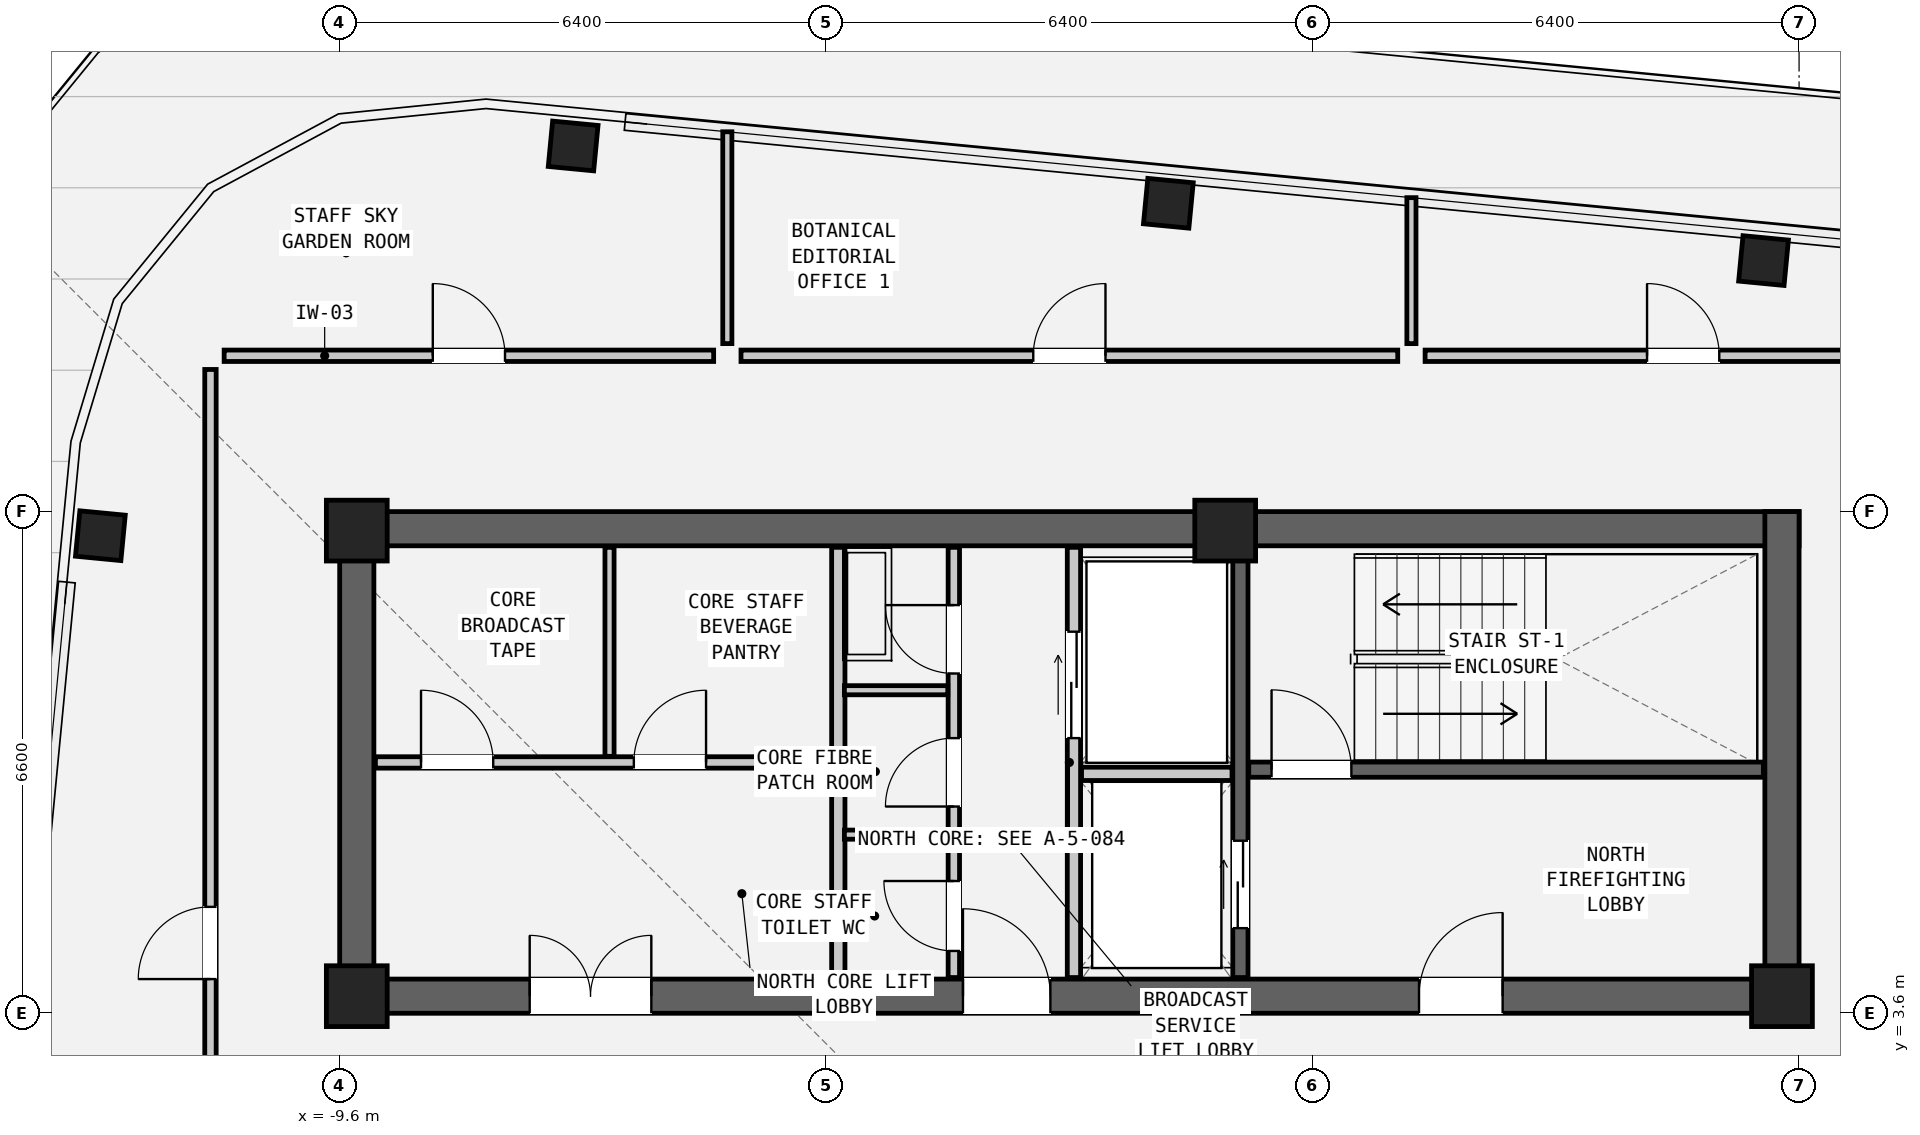
"""IFC4 building model, lengths in metres.
Left out: names, types, materials, properties, quantities, classifications, styles, units other than length and angle.
Written with IfcOpenShell. Run it as: python <this file> out.ifc"""

import sys

from ifc_helpers import new_model, si_unit, direction, frame, frame_2d, origin, origin_2d, place, context, subcontext, project, spatial, rectangle, hollow_rectangle, extrude, element, fill, save


model = new_model("IFC4")
c1 = context("Model", 3, precision=1e-05, world=origin(), true_north=direction((0.0, 1.0)))
c2 = subcontext(c1, "Body", "Model", "MODEL_VIEW")
j1 = project(units=[si_unit("LENGTHUNIT", "METRE"), si_unit("PLANEANGLEUNIT", "RADIAN")], contexts=[c1])
p1 = place(None, origin())
s1 = spatial("IfcSite", under=j1, at=p1, CompositionType="ELEMENT")
p2 = place(p1, origin())
s2 = spatial("IfcBuilding", under=s1, at=p2, CompositionType="ELEMENT")
p3 = place(p2, frame((0.0, 0.0, 273.35)))
s3 = spatial("IfcBuildingStorey", under=s2, at=p3, CompositionType="ELEMENT", Elevation=273.35)
p4 = place(p3, frame((-9.6, 9.975, 0.0), z_axis=(0.0, 0.0, 1.0), x_axis=(1.0, 0.0, 0.0)))
e1 = element("IfcWall", 1, at=p4, inside=s3, PredefinedType="SHEAR", context=c2, shape_type="SweptSolid", body=[
    extrude(rectangle(XDim=19.2, YDim=0.45, at=frame_2d((9.6, 0.0))), origin(), (0.0, 0.0, 1.0), 3.6),
])
p5 = place(p3, frame((-9.6, 3.825, 0.0), z_axis=(0.0, 0.0, 1.0), x_axis=(1.0, 0.0, 0.0)))
e2 = element("IfcWall", 2, at=p5, inside=s3, PredefinedType="SHEAR", context=c2, shape_type="SweptSolid", body=[
    extrude(rectangle(XDim=19.2, YDim=0.45, at=frame_2d((9.6, 0.0))), origin(), (0.0, 0.0, 1.0), 3.6),
])
p6 = place(p5, frame((14.2, 0.0, 0.0)))
e3 = element("IfcOpeningElement", 3, at=p6, cuts=e2, PredefinedType="OPENING", context=c2, shape_type="SweptSolid", body=[
    extrude(rectangle(XDim=1.1, YDim=2.08, at=frame_2d((0.55, 1.04))), frame((0.0, 0.237, 0.0), z_axis=(0.0, -1.0, 0.0), x_axis=(1.0, 0.0, 0.0)), (0.0, 0.0, 1.0), 0.474),
])
p7 = place(p5, frame((8.2, 0.0, 0.0)))
e4 = element("IfcOpeningElement", 4, at=p7, cuts=e2, PredefinedType="OPENING", context=c2, shape_type="SweptSolid", body=[
    extrude(rectangle(XDim=1.15, YDim=2.1, at=frame_2d((0.575, 1.05))), frame((0.0, 0.237, 0.0), z_axis=(0.0, -1.0, 0.0), x_axis=(1.0, 0.0, 0.0)), (0.0, 0.0, 1.0), 0.474),
])
p8 = place(p5, frame((2.5, 0.0, 0.0)))
e5 = element("IfcOpeningElement", 5, at=p8, cuts=e2, PredefinedType="OPENING", context=c2, shape_type="SweptSolid", body=[
    extrude(rectangle(XDim=1.6, YDim=2.12, at=frame_2d((0.8, 1.06))), frame((0.0, 0.237, 0.0), z_axis=(0.0, -1.0, 0.0), x_axis=(1.0, 0.0, 0.0)), (0.0, 0.0, 1.0), 0.474),
])
for number, where, z_axis, x_axis in (
    (6, (-9.375, 3.6, 0.0), (0.0, 0.0, 1.0), (0.0, 1.0, 0.0)),
    (7, (9.375, 3.6, 0.0), (0.0, 0.0, 1.0), (0.0, 1.0, 0.0)),
):
    element("IfcWall", number, at=place(p3, frame(where, z_axis=z_axis, x_axis=x_axis)), inside=s3, PredefinedType="SHEAR", context=c2, shape_type="SweptSolid", body=[
        extrude(rectangle(XDim=6.6, YDim=0.45, at=frame_2d((3.3, 0.0))), origin(), (0.0, 0.0, 1.0), 3.6),
    ])
for number, where, z_axis, x_axis in (
    (8, (9.133, 13.502, 0.0), (0.0, 0.0, 1.0), (0.995, -0.096, 0.0)),
    (9, (1.302, 14.256, 0.0), (0.0, 0.0, 1.0), (0.995, -0.096, 0.0)),
    (10, (-6.528, 15.01, 0.0), (0.0, 0.0, 1.0), (0.995, -0.096, 0.0)),
    (11, (-12.749, 9.883, 0.0), (0.0, 0.0, 1.0), (0.096, 0.995, 0.0)),
):
    element("IfcColumn", number, at=place(p3, frame(where, z_axis=z_axis, x_axis=x_axis)), inside=s3, PredefinedType="COLUMN", context=c2, shape_type="SweptSolid", body=[
        extrude(hollow_rectangle(XDim=0.6, YDim=0.6, WallThickness=0.04, at=origin_2d()), origin(), (0.0, 0.0, 1.0), 3.6),
    ])
for number, where, z_axis, x_axis in (
    (12, (-9.375, 9.95, 0.0), (0.0, 0.0, 1.0), (1.0, 0.0, 0.0)),
    (13, (2.05, 9.95, 0.0), (0.0, 0.0, 1.0), (1.0, 0.0, 0.0)),
    (14, (-9.375, 3.825, 0.0), (0.0, 0.0, 1.0), (1.0, 0.0, 0.0)),
    (15, (9.375, 3.825, 0.0), (0.0, 0.0, 1.0), (1.0, 0.0, 0.0)),
):
    element("IfcColumn", number, at=place(p3, frame(where, z_axis=z_axis, x_axis=x_axis)), inside=s3, PredefinedType="COLUMN", context=c2, shape_type="SweptSolid", body=[
        extrude(rectangle(XDim=0.8, YDim=0.8, at=origin_2d()), origin(), (0.0, 0.0, 1.0), 3.6),
    ])
p9 = place(p3, frame((2.36, 6.805, 0.0), z_axis=(0.0, 0.0, 1.0), x_axis=(1.0, 0.0, 0.0)))
e16 = element("IfcWall", 16, at=p9, inside=s3, PredefinedType="SHEAR", context=c2, shape_type="SweptSolid", body=[
    extrude(rectangle(XDim=6.77, YDim=0.2, at=frame_2d((3.385, 0.0))), origin(), (0.0, 0.0, 1.0), 3.41),
])
p10 = place(p9, frame((0.3, 0.0, 0.0)))
e17 = element("IfcOpeningElement", 17, at=p10, cuts=e16, PredefinedType="OPENING", context=c2, shape_type="SweptSolid", body=[
    extrude(rectangle(XDim=1.05, YDim=2.08, at=frame_2d((0.525, 1.04))), frame((0.0, 0.112, 0.0), z_axis=(0.0, -1.0, 0.0), x_axis=(1.0, 0.0, 0.0)), (0.0, 0.0, 1.0), 0.224),
])
p11 = place(p3, frame((2.25, 4.07, 0.0), z_axis=(0.0, 0.0, 1.0), x_axis=(0.0, 1.0, 0.0)))
e18 = element("IfcWall", 18, at=p11, inside=s3, PredefinedType="SHEAR", context=c2, shape_type="SweptSolid", body=[
    extrude(rectangle(XDim=5.66, YDim=0.2, at=frame_2d((2.83, 0.0))), origin(), (0.0, 0.0, 1.0), 3.41),
])
p12 = place(p11, frame((0.65, 0.0, 0.0)))
e19 = element("IfcOpeningElement", 19, at=p12, cuts=e18, PredefinedType="OPENING", context=c2, shape_type="SweptSolid", body=[
    extrude(rectangle(XDim=1.15, YDim=2.08, at=frame_2d((0.575, 1.04))), frame((0.0, 0.112, 0.0), z_axis=(0.0, -1.0, 0.0), x_axis=(1.0, 0.0, 0.0)), (0.0, 0.0, 1.0), 0.224),
])
p13 = place(p3, frame((0.06, 4.07, 0.0), z_axis=(0.0, 0.0, 1.0), x_axis=(0.0, 1.0, 0.0)))
e20 = element("IfcWall", 20, at=p13, inside=s3, PredefinedType="PARTITIONING", context=c2, shape_type="SweptSolid", body=[
    extrude(rectangle(XDim=5.66, YDim=0.175, at=frame_2d((2.83, 0.0))), origin(), (0.0, 0.0, 1.0), 3.41),
])
p14 = place(p13, frame((3.15, 0.0, 0.0)))
e21 = element("IfcOpeningElement", 21, at=p14, cuts=e20, PredefinedType="OPENING", context=c2, shape_type="SweptSolid", body=[
    extrude(rectangle(XDim=1.4, YDim=2.12, at=frame_2d((0.7, 1.06))), frame((0.0, 0.1, 0.0), z_axis=(0.0, -1.0, 0.0), x_axis=(1.0, 0.0, 0.0)), (0.0, 0.0, 1.0), 0.199),
])
p15 = place(p3, frame((0.16, 6.75, 0.0), z_axis=(0.0, 0.0, 1.0), x_axis=(1.0, 0.0, 0.0)))
e22 = element("IfcWall", 22, at=p15, inside=s3, PredefinedType="PARTITIONING", context=c2, shape_type="SweptSolid", body=[
    extrude(rectangle(XDim=1.98, YDim=0.175, at=frame_2d((0.99, 0.0))), origin(), (0.0, 0.0, 1.0), 3.41),
])
p16 = place(p3, frame((-3.04, 4.07, 0.0), z_axis=(0.0, 0.0, 1.0), x_axis=(0.0, 1.0, 0.0)))
e23 = element("IfcWall", 23, at=p16, inside=s3, PredefinedType="PARTITIONING", context=c2, shape_type="SweptSolid", body=[
    extrude(rectangle(XDim=5.66, YDim=0.175, at=frame_2d((2.83, 0.0))), origin(), (0.0, 0.0, 1.0), 3.41),
])
p17 = place(p3, frame((-1.52, 4.07, 0.0), z_axis=(0.0, 0.0, 1.0), x_axis=(0.0, 1.0, 0.0)))
e24 = element("IfcWall", 24, at=p17, inside=s3, PredefinedType="PARTITIONING", context=c2, shape_type="SweptSolid", body=[
    extrude(rectangle(XDim=5.66, YDim=0.15, at=frame_2d((2.83, 0.0))), origin(), (0.0, 0.0, 1.0), 3.41),
])
p18 = place(p17, frame((4.0, 0.0, 0.0)))
e25 = element("IfcOpeningElement", 25, at=p18, cuts=e24, PredefinedType="OPENING", context=c2, shape_type="SweptSolid", body=[
    extrude(rectangle(XDim=0.9, YDim=2.05, at=frame_2d((0.45, 1.025))), frame((0.0, 0.087, 0.0), z_axis=(0.0, -1.0, 0.0), x_axis=(1.0, 0.0, 0.0)), (0.0, 0.0, 1.0), 0.174),
])
p19 = place(p17, frame((2.25, 0.0, 0.0)))
e26 = element("IfcOpeningElement", 26, at=p19, cuts=e24, PredefinedType="OPENING", context=c2, shape_type="SweptSolid", body=[
    extrude(rectangle(XDim=0.9, YDim=2.05, at=frame_2d((0.45, 1.025))), frame((0.0, 0.087, 0.0), z_axis=(0.0, -1.0, 0.0), x_axis=(1.0, 0.0, 0.0)), (0.0, 0.0, 1.0), 0.174),
])
p20 = place(p17, frame((0.35, 0.0, 0.0)))
e27 = element("IfcOpeningElement", 27, at=p20, cuts=e24, PredefinedType="OPENING", context=c2, shape_type="SweptSolid", body=[
    extrude(rectangle(XDim=0.92, YDim=2.1, at=frame_2d((0.46, 1.05))), frame((0.0, 0.087, 0.0), z_axis=(0.0, -1.0, 0.0), x_axis=(1.0, 0.0, 0.0)), (0.0, 0.0, 1.0), 0.174),
])
for number, where, z_axis, x_axis in (
    (28, (-2.96, 5.95, 0.0), (0.0, 0.0, 1.0), (1.0, 0.0, 0.0)),
    (29, (-2.96, 7.85, 0.0), (0.0, 0.0, 1.0), (1.0, 0.0, 0.0)),
):
    element("IfcWall", number, at=place(p3, frame(where, z_axis=z_axis, x_axis=x_axis)), inside=s3, PredefinedType="PARTITIONING", context=c2, shape_type="SweptSolid", body=[
        extrude(rectangle(XDim=1.36, YDim=0.12, at=frame_2d((0.68, 0.0))), origin(), (0.0, 0.0, 1.0), 3.41),
    ])
p21 = place(p3, frame((-9.13, 6.9, 0.0), z_axis=(0.0, 0.0, 1.0), x_axis=(1.0, 0.0, 0.0)))
e30 = element("IfcWall", 30, at=p21, inside=s3, PredefinedType="PARTITIONING", context=c2, shape_type="SweptSolid", body=[
    extrude(rectangle(XDim=6.01, YDim=0.15, at=frame_2d((3.005, 0.0))), origin(), (0.0, 0.0, 1.0), 3.41),
])
p22 = place(p21, frame((0.6, 0.0, 0.0)))
e31 = element("IfcOpeningElement", 31, at=p22, cuts=e30, PredefinedType="OPENING", context=c2, shape_type="SweptSolid", body=[
    extrude(rectangle(XDim=0.95, YDim=2.1, at=frame_2d((0.475, 1.05))), frame((0.0, 0.087, 0.0), z_axis=(0.0, -1.0, 0.0), x_axis=(1.0, 0.0, 0.0)), (0.0, 0.0, 1.0), 0.174),
])
p23 = place(p21, frame((3.4, 0.0, 0.0)))
e32 = element("IfcOpeningElement", 32, at=p23, cuts=e30, PredefinedType="OPENING", context=c2, shape_type="SweptSolid", body=[
    extrude(rectangle(XDim=0.95, YDim=2.1, at=frame_2d((0.475, 1.05))), frame((0.0, 0.087, 0.0), z_axis=(0.0, -1.0, 0.0), x_axis=(1.0, 0.0, 0.0)), (0.0, 0.0, 1.0), 0.174),
])
p24 = place(p3, frame((-6.05, 6.98, 0.0), z_axis=(0.0, 0.0, 1.0), x_axis=(0.0, 1.0, 0.0)))
e33 = element("IfcWall", 33, at=p24, inside=s3, PredefinedType="PARTITIONING", context=c2, shape_type="SweptSolid", body=[
    extrude(rectangle(XDim=2.75, YDim=0.12, at=frame_2d((1.375, 0.0))), origin(), (0.0, 0.0, 1.0), 3.41),
])
p25 = place(p3, frame((-4.5, 12.41, 0.0), z_axis=(0.0, 0.0, 1.0), x_axis=(0.0, 1.0, 0.0)))
e34 = element("IfcWall", 34, at=p25, inside=s3, PredefinedType="PARTITIONING", context=c2, shape_type="SweptSolid", body=[
    extrude(rectangle(XDim=2.787, YDim=0.12, at=frame_2d((1.394, 0.0))), origin(), (0.0, 0.0, 1.0), 3.41),
])
p26 = place(p3, frame((4.5, 12.41, 0.0), z_axis=(0.0, 0.0, 1.0), x_axis=(0.0, 1.0, 0.0)))
e35 = element("IfcWall", 35, at=p26, inside=s3, PredefinedType="PARTITIONING", context=c2, shape_type="SweptSolid", body=[
    extrude(rectangle(XDim=1.92, YDim=0.12, at=frame_2d((0.96, 0.0))), origin(), (0.0, 0.0, 1.0), 3.41),
])
p27 = place(p3, frame((-11.12, 12.25, 0.0), z_axis=(0.0, 0.0, 1.0), x_axis=(1.0, 0.0, 0.0)))
e36 = element("IfcWall", 36, at=p27, inside=s3, PredefinedType="PARTITIONING", context=c2, shape_type="SweptSolid", body=[
    extrude(rectangle(XDim=6.44, YDim=0.15, at=frame_2d((3.22, 0.0))), origin(), (0.0, 0.0, 1.0), 3.41),
])
p28 = place(p27, frame((2.745, 0.0, 0.0)))
e37 = element("IfcOpeningElement", 37, at=p28, cuts=e36, PredefinedType="OPENING", context=c2, shape_type="SweptSolid", body=[
    extrude(rectangle(XDim=0.95, YDim=2.1, at=frame_2d((0.475, 1.05))), frame((0.0, 0.087, 0.0), z_axis=(0.0, -1.0, 0.0), x_axis=(1.0, 0.0, 0.0)), (0.0, 0.0, 1.0), 0.174),
])
p29 = place(p3, frame((-4.32, 12.25, 0.0), z_axis=(0.0, 0.0, 1.0), x_axis=(1.0, 0.0, 0.0)))
e38 = element("IfcWall", 38, at=p29, inside=s3, PredefinedType="PARTITIONING", context=c2, shape_type="SweptSolid", body=[
    extrude(rectangle(XDim=8.64, YDim=0.15, at=frame_2d((4.32, 0.0))), origin(), (0.0, 0.0, 1.0), 3.41),
])
p30 = place(p29, frame((3.845, 0.0, 0.0)))
e39 = element("IfcOpeningElement", 39, at=p30, cuts=e38, PredefinedType="OPENING", context=c2, shape_type="SweptSolid", body=[
    extrude(rectangle(XDim=0.95, YDim=2.1, at=frame_2d((0.475, 1.05))), frame((0.0, 0.087, 0.0), z_axis=(0.0, -1.0, 0.0), x_axis=(1.0, 0.0, 0.0)), (0.0, 0.0, 1.0), 0.174),
])
p31 = place(p3, frame((4.68, 12.25, 0.0), z_axis=(0.0, 0.0, 1.0), x_axis=(1.0, 0.0, 0.0)))
e40 = element("IfcWall", 40, at=p31, inside=s3, PredefinedType="PARTITIONING", context=c2, shape_type="SweptSolid", body=[
    extrude(rectangle(XDim=6.79, YDim=0.15, at=frame_2d((3.395, 0.0))), origin(), (0.0, 0.0, 1.0), 3.41),
])
p32 = place(p31, frame((2.92, 0.0, 0.0)))
e41 = element("IfcOpeningElement", 41, at=p32, cuts=e40, PredefinedType="OPENING", context=c2, shape_type="SweptSolid", body=[
    extrude(rectangle(XDim=0.95, YDim=2.1, at=frame_2d((0.475, 1.05))), frame((0.0, 0.087, 0.0), z_axis=(0.0, -1.0, 0.0), x_axis=(1.0, 0.0, 0.0)), (0.0, 0.0, 1.0), 0.174),
])
p33 = place(p3, frame((-11.3, -3.02, 0.0), z_axis=(0.0, 0.0, 1.0), x_axis=(0.0, 1.0, 0.0)))
e42 = element("IfcWall", 42, at=p33, inside=s3, PredefinedType="PARTITIONING", context=c2, shape_type="SweptSolid", body=[
    extrude(rectangle(XDim=15.09, YDim=0.15, at=frame_2d((7.545, 0.0))), origin(), (0.0, 0.0, 1.0), 3.41),
])
p34 = place(p33, frame((7.07, 0.0, 0.0)))
e43 = element("IfcOpeningElement", 43, at=p34, cuts=e42, PredefinedType="OPENING", context=c2, shape_type="SweptSolid", body=[
    extrude(rectangle(XDim=0.95, YDim=2.1, at=frame_2d((0.475, 1.05))), frame((0.0, 0.087, 0.0), z_axis=(0.0, -1.0, 0.0), x_axis=(1.0, 0.0, 0.0)), (0.0, 0.0, 1.0), 0.174),
])
p35 = place(p10, origin())
e44 = element("IfcDoor", 44, at=p35, inside=s3, OperationType="SINGLE_SWING_LEFT", PredefinedType="DOOR", context=c2, shape_type="SweptSolid", body=[
    extrude(rectangle(XDim=1.05, YDim=2.08, at=frame_2d((0.525, 1.04))), frame((0.0, 0.025, 0.0), z_axis=(0.0, -1.0, 0.0), x_axis=(1.0, 0.0, 0.0)), (0.0, 0.0, 1.0), 0.05),
])
fill(e17, e44)
p36 = place(p6, origin())
e45 = element("IfcDoor", 45, at=p36, inside=s3, OperationType="SINGLE_SWING_RIGHT", PredefinedType="DOOR", context=c2, shape_type="SweptSolid", body=[
    extrude(rectangle(XDim=1.1, YDim=2.08, at=frame_2d((0.55, 1.04))), frame((0.0, 0.025, 0.0), z_axis=(0.0, -1.0, 0.0), x_axis=(1.0, 0.0, 0.0)), (0.0, 0.0, 1.0), 0.05),
])
fill(e3, e45)
p37 = place(p12, origin())
e46 = element("IfcDoor", 46, at=p37, inside=s3, OperationType="DOUBLE_DOOR_SLIDING", PredefinedType="DOOR", context=c2, shape_type="SweptSolid", body=[
    extrude(rectangle(XDim=1.15, YDim=2.08, at=frame_2d((0.575, 1.04))), frame((0.0, 0.025, 0.0), z_axis=(0.0, -1.0, 0.0), x_axis=(1.0, 0.0, 0.0)), (0.0, 0.0, 1.0), 0.05),
])
fill(e19, e46)
p38 = place(p14, origin())
e47 = element("IfcDoor", 47, at=p38, inside=s3, OperationType="DOUBLE_DOOR_SLIDING", PredefinedType="DOOR", context=c2, shape_type="SweptSolid", body=[
    extrude(rectangle(XDim=1.4, YDim=2.12, at=frame_2d((0.7, 1.06))), frame((0.0, 0.025, 0.0), z_axis=(0.0, -1.0, 0.0), x_axis=(1.0, 0.0, 0.0)), (0.0, 0.0, 1.0), 0.05),
])
fill(e21, e47)
p39 = place(p7, origin())
e48 = element("IfcDoor", 48, at=p39, inside=s3, OperationType="SINGLE_SWING_LEFT", PredefinedType="DOOR", context=c2, shape_type="SweptSolid", body=[
    extrude(rectangle(XDim=1.15, YDim=2.1, at=frame_2d((0.575, 1.05))), frame((0.0, 0.025, 0.0), z_axis=(0.0, -1.0, 0.0), x_axis=(1.0, 0.0, 0.0)), (0.0, 0.0, 1.0), 0.05),
])
fill(e4, e48)
p40 = place(p18, origin())
e49 = element("IfcDoor", 49, at=p40, inside=s3, OperationType="SINGLE_SWING_RIGHT", PredefinedType="DOOR", context=c2, shape_type="SweptSolid", body=[
    extrude(rectangle(XDim=0.9, YDim=2.05, at=frame_2d((0.45, 1.025))), frame((0.0, 0.025, 0.0), z_axis=(0.0, -1.0, 0.0), x_axis=(1.0, 0.0, 0.0)), (0.0, 0.0, 1.0), 0.05),
])
fill(e25, e49)
p41 = place(p19, origin())
e50 = element("IfcDoor", 50, at=p41, inside=s3, OperationType="SINGLE_SWING_LEFT", PredefinedType="DOOR", context=c2, shape_type="SweptSolid", body=[
    extrude(rectangle(XDim=0.9, YDim=2.05, at=frame_2d((0.45, 1.025))), frame((0.0, 0.025, 0.0), z_axis=(0.0, -1.0, 0.0), x_axis=(1.0, 0.0, 0.0)), (0.0, 0.0, 1.0), 0.05),
])
fill(e26, e50)
p42 = place(p20, origin())
e51 = element("IfcDoor", 51, at=p42, inside=s3, OperationType="SINGLE_SWING_RIGHT", PredefinedType="DOOR", context=c2, shape_type="SweptSolid", body=[
    extrude(rectangle(XDim=0.92, YDim=2.1, at=frame_2d((0.46, 1.05))), frame((0.0, 0.025, 0.0), z_axis=(0.0, -1.0, 0.0), x_axis=(1.0, 0.0, 0.0)), (0.0, 0.0, 1.0), 0.05),
])
fill(e27, e51)
p43 = place(p8, origin())
e52 = element("IfcDoor", 52, at=p43, inside=s3, OperationType="DOUBLE_DOOR_SINGLE_SWING", PredefinedType="DOOR", context=c2, shape_type="SweptSolid", body=[
    extrude(rectangle(XDim=1.6, YDim=2.12, at=frame_2d((0.8, 1.06))), frame((0.0, 0.025, 0.0), z_axis=(0.0, -1.0, 0.0), x_axis=(1.0, 0.0, 0.0)), (0.0, 0.0, 1.0), 0.05),
])
fill(e5, e52)
p44 = place(p22, origin())
e53 = element("IfcDoor", 53, at=p44, inside=s3, OperationType="SINGLE_SWING_LEFT", PredefinedType="DOOR", context=c2, shape_type="SweptSolid", body=[
    extrude(rectangle(XDim=0.95, YDim=2.1, at=frame_2d((0.475, 1.05))), frame((0.0, 0.025, 0.0), z_axis=(0.0, -1.0, 0.0), x_axis=(1.0, 0.0, 0.0)), (0.0, 0.0, 1.0), 0.05),
])
fill(e31, e53)
p45 = place(p23, origin())
e54 = element("IfcDoor", 54, at=p45, inside=s3, OperationType="SINGLE_SWING_RIGHT", PredefinedType="DOOR", context=c2, shape_type="SweptSolid", body=[
    extrude(rectangle(XDim=0.95, YDim=2.1, at=frame_2d((0.475, 1.05))), frame((0.0, 0.025, 0.0), z_axis=(0.0, -1.0, 0.0), x_axis=(1.0, 0.0, 0.0)), (0.0, 0.0, 1.0), 0.05),
])
fill(e32, e54)
p46 = place(p28, origin())
e55 = element("IfcDoor", 55, at=p46, inside=s3, OperationType="SINGLE_SWING_LEFT", PredefinedType="DOOR", context=c2, shape_type="SweptSolid", body=[
    extrude(rectangle(XDim=0.95, YDim=2.1, at=frame_2d((0.475, 1.05))), frame((0.0, 0.025, 0.0), z_axis=(0.0, -1.0, 0.0), x_axis=(1.0, 0.0, 0.0)), (0.0, 0.0, 1.0), 0.05),
])
fill(e37, e55)
p47 = place(p30, origin())
e56 = element("IfcDoor", 56, at=p47, inside=s3, OperationType="SINGLE_SWING_RIGHT", PredefinedType="DOOR", context=c2, shape_type="SweptSolid", body=[
    extrude(rectangle(XDim=0.95, YDim=2.1, at=frame_2d((0.475, 1.05))), frame((0.0, 0.025, 0.0), z_axis=(0.0, -1.0, 0.0), x_axis=(1.0, 0.0, 0.0)), (0.0, 0.0, 1.0), 0.05),
])
fill(e39, e56)
p48 = place(p32, origin())
e57 = element("IfcDoor", 57, at=p48, inside=s3, OperationType="SINGLE_SWING_LEFT", PredefinedType="DOOR", context=c2, shape_type="SweptSolid", body=[
    extrude(rectangle(XDim=0.95, YDim=2.1, at=frame_2d((0.475, 1.05))), frame((0.0, 0.025, 0.0), z_axis=(0.0, -1.0, 0.0), x_axis=(1.0, 0.0, 0.0)), (0.0, 0.0, 1.0), 0.05),
])
fill(e41, e57)
p49 = place(p34, origin())
e58 = element("IfcDoor", 58, at=p49, inside=s3, OperationType="SINGLE_SWING_LEFT", PredefinedType="DOOR", context=c2, shape_type="SweptSolid", body=[
    extrude(rectangle(XDim=0.95, YDim=2.1, at=frame_2d((0.475, 1.05))), frame((0.0, 0.025, 0.0), z_axis=(0.0, -1.0, 0.0), x_axis=(1.0, 0.0, 0.0)), (0.0, 0.0, 1.0), 0.05),
])
fill(e43, e58)
save(model, sys.argv[1])
